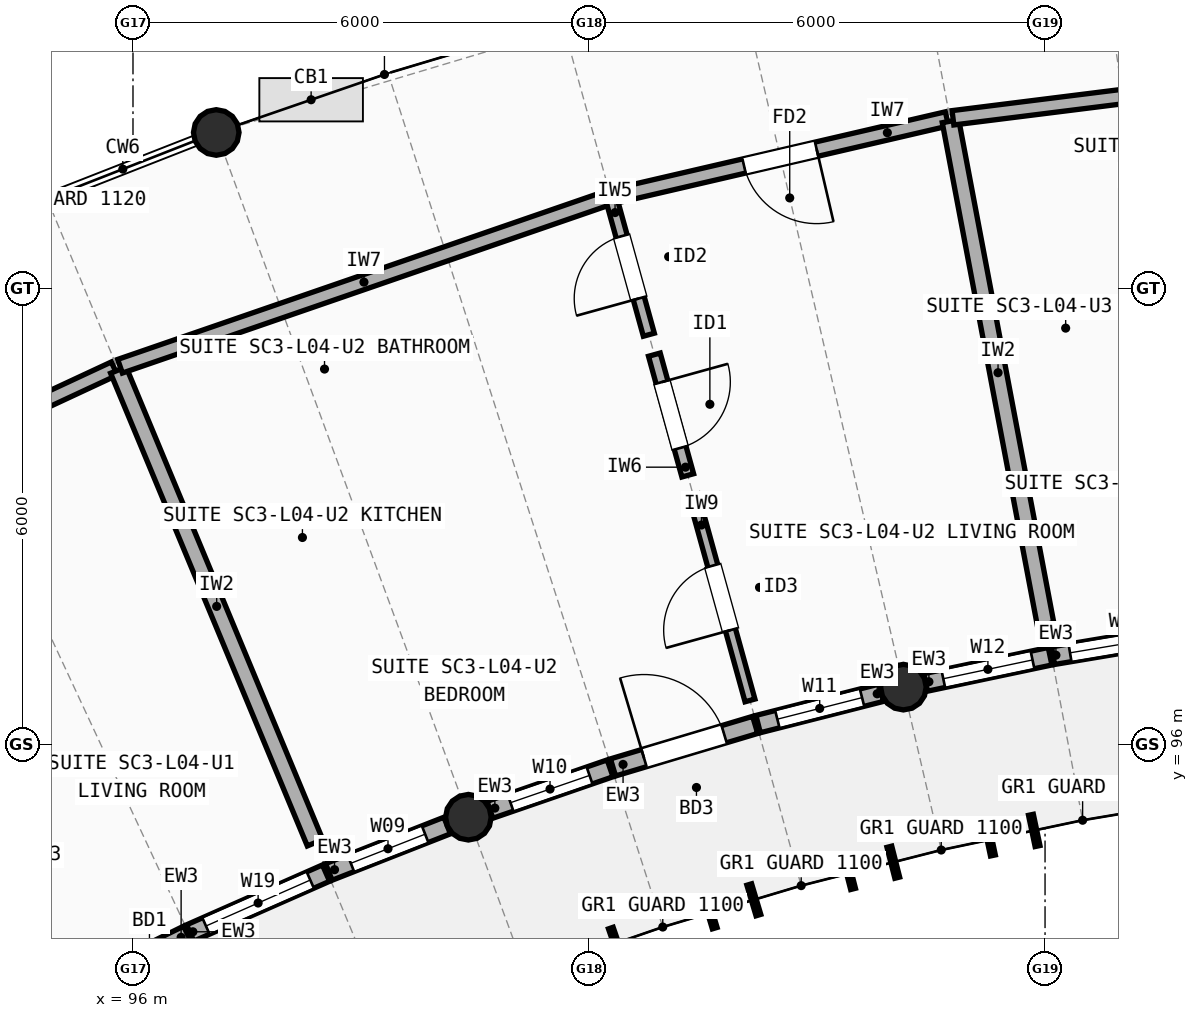
"""IFC4 building model, lengths in metres.
Left out: names, types, materials, properties, quantities, classifications, styles, units other than length and angle.
Written with IfcOpenShell. Run it as: python <this file> out.ifc"""

import sys

from ifc_helpers import new_model, si_unit, direction, frame, frame_2d, origin, origin_2d, place, context, subcontext, project, spatial, rectangle, circle, extrude, element, fill, save


model = new_model("IFC4")
c1 = context("Model", 3, precision=1e-05, world=origin(), true_north=direction((0.0, 1.0)))
c2 = subcontext(c1, "Body", "Model", "MODEL_VIEW")
j1 = project(units=[si_unit("LENGTHUNIT", "METRE"), si_unit("PLANEANGLEUNIT", "RADIAN")], contexts=[c1])
p1 = place(None, origin())
s1 = spatial("IfcSite", under=j1, at=p1, CompositionType="ELEMENT")
p2 = place(p1, origin())
s2 = spatial("IfcBuilding", under=s1, at=p2, CompositionType="ELEMENT")
p3 = place(p2, frame((0.0, 0.0, 14.1)))
s3 = spatial("IfcBuildingStorey", under=s2, at=p3, CompositionType="ELEMENT", Elevation=14.1)
for number, where, z_axis, x_axis in (
    (1, (100.413, 95.043, 0.0), (0.0, 0.0, 1.0), (1.0, 0.0, 0.0)),
    (2, (97.095, 104.052, 0.0), (0.0, 0.0, 1.0), (1.0, 0.0, 0.0)),
    (3, (106.136, 96.754, 0.0), (0.0, 0.0, 1.0), (1.0, 0.0, 0.0)),
):
    element("IfcColumn", number, at=place(p3, frame(where, z_axis=z_axis, x_axis=x_axis)), inside=s3, PredefinedType="COLUMN", context=c2, shape_type="SweptSolid", body=[
        extrude(circle(Radius=0.3, at=origin_2d()), origin(), (0.0, 0.0, 1.0), 2.948),
    ])
p4 = place(p3, frame((95.216, 92.766, 0.0), z_axis=(0.0, 0.0, 1.0), x_axis=(0.897558380725, 0.440895626186, 0.0)))
e4 = element("IfcWall", 4, at=p4, inside=s3, PredefinedType="STANDARD", context=c2, shape_type="SweptSolid", body=[
    extrude(rectangle(XDim=1.672, YDim=0.235, at=frame_2d((0.836, 0.0))), origin(), (0.0, 0.0, 1.0), 2.684),
])
p5 = place(p4, frame((0.336, 0.0, 0.0)))
e5 = element("IfcOpeningElement", 5, at=p5, cuts=e4, PredefinedType="OPENING", context=c2, shape_type="SweptSolid", body=[
    extrude(rectangle(XDim=1.0, YDim=2.15, at=frame_2d((0.5, 1.075))), frame((0.0, 0.127, 0.0), z_axis=(0.0, -1.0, 0.0), x_axis=(1.0, 0.0, 0.0)), (0.0, 0.0, 1.0), 0.255),
])
p6 = place(p3, frame((96.753, 93.521, 0.0), z_axis=(0.0, 0.0, 1.0), x_axis=(0.915126852478, 0.403166025197, 0.0)))
e6 = element("IfcWall", 6, at=p6, inside=s3, PredefinedType="STANDARD", context=c2, shape_type="SweptSolid", body=[
    extrude(rectangle(XDim=1.952, YDim=0.235, at=frame_2d((0.976, 0.0))), origin(), (0.0, 0.0, 1.0), 2.684),
])
p7 = place(p6, frame((0.226, 0.0, 0.85)))
e7 = element("IfcOpeningElement", 7, at=p7, cuts=e6, PredefinedType="OPENING", context=c2, shape_type="SweptSolid", body=[
    extrude(rectangle(XDim=1.5, YDim=1.5, at=frame_2d((0.75, 0.75))), frame((0.0, 0.127, 0.0), z_axis=(0.0, -1.0, 0.0), x_axis=(1.0, 0.0, 0.0)), (0.0, 0.0, 1.0), 0.255),
])
p8 = place(p3, frame((98.577, 94.323, 0.0), z_axis=(0.0, 0.0, 1.0), x_axis=(0.930962495902, 0.365114819233, 0.0)))
e8 = element("IfcWall", 8, at=p8, inside=s3, PredefinedType="STANDARD", context=c2, shape_type="SweptSolid", body=[
    extrude(rectangle(XDim=1.672, YDim=0.235, at=frame_2d((0.836, 0.0))), origin(), (0.0, 0.0, 1.0), 2.684),
])
p9 = place(p8, frame((0.311, 0.0, 0.85)))
e9 = element("IfcOpeningElement", 9, at=p9, cuts=e8, PredefinedType="OPENING", context=c2, shape_type="SweptSolid", body=[
    extrude(rectangle(XDim=1.05, YDim=1.35, at=frame_2d((0.525, 0.675))), frame((0.0, 0.127, 0.0), z_axis=(0.0, -1.0, 0.0), x_axis=(1.0, 0.0, 0.0)), (0.0, 0.0, 1.0), 0.255),
])
p10 = place(p3, frame((100.697, 95.141, 0.0), z_axis=(0.0, 0.0, 1.0), x_axis=(0.94537763557, 0.32597718657, 0.0)))
e10 = element("IfcWall", 10, at=p10, inside=s3, PredefinedType="STANDARD", context=c2, shape_type="SweptSolid", body=[
    extrude(rectangle(XDim=1.672, YDim=0.235, at=frame_2d((0.836, 0.0))), origin(), (0.0, 0.0, 1.0), 2.684),
])
p11 = place(p10, frame((0.286, 0.0, 0.85)))
e11 = element("IfcOpeningElement", 11, at=p11, cuts=e10, PredefinedType="OPENING", context=c2, shape_type="SweptSolid", body=[
    extrude(rectangle(XDim=1.1, YDim=1.45, at=frame_2d((0.55, 0.725))), frame((0.0, 0.127, 0.0), z_axis=(0.0, -1.0, 0.0), x_axis=(1.0, 0.0, 0.0)), (0.0, 0.0, 1.0), 0.255),
])
p12 = place(p3, frame((102.316, 95.698, 0.0), z_axis=(0.0, 0.0, 1.0), x_axis=(0.95807718441, 0.286510224446, 0.0)))
e12 = element("IfcWall", 12, at=p12, inside=s3, PredefinedType="STANDARD", context=c2, shape_type="SweptSolid", body=[
    extrude(rectangle(XDim=1.952, YDim=0.235, at=frame_2d((0.976, 0.0))), origin(), (0.0, 0.0, 1.0), 2.684),
])
p13 = place(p12, frame((0.426, 0.0, 0.0)))
e13 = element("IfcOpeningElement", 13, at=p13, cuts=e12, PredefinedType="OPENING", context=c2, shape_type="SweptSolid", body=[
    extrude(rectangle(XDim=1.1, YDim=2.15, at=frame_2d((0.55, 1.075))), frame((0.0, 0.127, 0.0), z_axis=(0.0, -1.0, 0.0), x_axis=(1.0, 0.0, 0.0)), (0.0, 0.0, 1.0), 0.255),
])
p14 = place(p3, frame((104.225, 96.268, 0.0), z_axis=(0.0, 0.0, 1.0), x_axis=(0.969164394975, 0.246415047254, 0.0)))
e14 = element("IfcWall", 14, at=p14, inside=s3, PredefinedType="STANDARD", context=c2, shape_type="SweptSolid", body=[
    extrude(rectangle(XDim=1.672, YDim=0.235, at=frame_2d((0.836, 0.0))), origin(), (0.0, 0.0, 1.0), 2.684),
])
p15 = place(p14, frame((0.261, 0.0, 0.85)))
e15 = element("IfcOpeningElement", 15, at=p15, cuts=e14, PredefinedType="OPENING", context=c2, shape_type="SweptSolid", body=[
    extrude(rectangle(XDim=1.15, YDim=1.45, at=frame_2d((0.575, 0.725))), frame((0.0, 0.127, 0.0), z_axis=(0.0, -1.0, 0.0), x_axis=(1.0, 0.0, 0.0)), (0.0, 0.0, 1.0), 0.255),
])
p16 = place(p3, frame((106.43, 96.816, 0.0), z_axis=(0.0, 0.0, 1.0), x_axis=(0.978524995622, 0.206128195408, 0.0)))
e16 = element("IfcWall", 16, at=p16, inside=s3, PredefinedType="STANDARD", context=c2, shape_type="SweptSolid", body=[
    extrude(rectangle(XDim=1.672, YDim=0.235, at=frame_2d((0.836, 0.0))), origin(), (0.0, 0.0, 1.0), 2.684),
])
p17 = place(p16, frame((0.236, 0.0, 0.85)))
e17 = element("IfcOpeningElement", 17, at=p17, cuts=e16, PredefinedType="OPENING", context=c2, shape_type="SweptSolid", body=[
    extrude(rectangle(XDim=1.2, YDim=1.35, at=frame_2d((0.6, 0.675))), frame((0.0, 0.127, 0.0), z_axis=(0.0, -1.0, 0.0), x_axis=(1.0, 0.0, 0.0)), (0.0, 0.0, 1.0), 0.255),
])
p18 = place(p3, frame((108.105, 97.168, 0.0), z_axis=(0.0, 0.0, 1.0), x_axis=(0.986241418229, 0.165311418144, 0.0)))
e18 = element("IfcWall", 18, at=p18, inside=s3, PredefinedType="STANDARD", context=c2, shape_type="SweptSolid", body=[
    extrude(rectangle(XDim=1.952, YDim=0.235, at=frame_2d((0.976, 0.0))), origin(), (0.0, 0.0, 1.0), 2.684),
])
p19 = place(p18, frame((0.226, 0.0, 0.85)))
e19 = element("IfcOpeningElement", 19, at=p19, cuts=e18, PredefinedType="OPENING", context=c2, shape_type="SweptSolid", body=[
    extrude(rectangle(XDim=1.5, YDim=1.4, at=frame_2d((0.75, 0.7))), frame((0.0, 0.127, 0.0), z_axis=(0.0, -1.0, 0.0), x_axis=(1.0, 0.0, 0.0)), (0.0, 0.0, 1.0), 0.255),
])
p20 = place(p3, frame((91.675, 99.046, 0.0), z_axis=(0.0, 0.0, 1.0), x_axis=(0.906512639591, 0.422178675755, 0.0)))
e20 = element("IfcWall", 20, at=p20, inside=s3, PredefinedType="SOLIDWALL", context=c2, shape_type="SweptSolid", body=[
    extrude(rectangle(XDim=4.501, YDim=0.19, at=frame_2d((2.251, 0.0))), origin(), (0.0, 0.0, 1.0), 2.742),
])
p21 = place(p20, frame((1.751, 0.0, 0.0)))
e21 = element("IfcOpeningElement", 21, at=p21, cuts=e20, PredefinedType="OPENING", context=c2, shape_type="SweptSolid", body=[
    extrude(rectangle(XDim=1.0, YDim=2.15, at=frame_2d((0.5, 1.075))), frame((0.0, 0.105, 0.0), z_axis=(0.0, -1.0, 0.0), x_axis=(1.0, 0.0, 0.0)), (0.0, 0.0, 1.0), 0.21),
])
p22 = place(p3, frame((98.395, 94.707, 0.0), z_axis=(0.0, 0.0, 1.0), x_axis=(-0.384190705314, 0.923253758157, 0.0)))
e22 = element("IfcWall", 22, at=p22, inside=s3, PredefinedType="SOLIDWALL", context=c2, shape_type="SweptSolid", body=[
    extrude(rectangle(XDim=6.736, YDim=0.22, at=frame_2d((3.368, 0.0))), origin(), (0.0, 0.0, 1.0), 2.762),
])
p23 = place(p3, frame((95.83, 100.976, 0.0), z_axis=(0.0, 0.0, 1.0), x_axis=(0.945371453115, 0.325995115969, 0.0)))
e23 = element("IfcWall", 23, at=p23, inside=s3, PredefinedType="SOLIDWALL", context=c2, shape_type="SweptSolid", body=[
    extrude(rectangle(XDim=6.79, YDim=0.19, at=frame_2d((3.395, 0.0))), origin(), (0.0, 0.0, 1.0), 2.722),
])
p24 = place(p3, frame((102.325, 103.212, 0.0), z_axis=(0.0, 0.0, 1.0), x_axis=(0.974052809246, 0.226320844821, 0.0)))
e24 = element("IfcWall", 24, at=p24, inside=s3, PredefinedType="SOLIDWALL", context=c2, shape_type="SweptSolid", body=[
    extrude(rectangle(XDim=4.501, YDim=0.19, at=frame_2d((2.251, 0.0))), origin(), (0.0, 0.0, 1.0), 2.722),
])
p25 = place(p24, frame((1.761, 0.0, 0.0)))
e25 = element("IfcOpeningElement", 25, at=p25, cuts=e24, PredefinedType="OPENING", context=c2, shape_type="SweptSolid", body=[
    extrude(rectangle(XDim=0.98, YDim=2.15, at=frame_2d((0.49, 1.075))), frame((0.0, 0.105, 0.0), z_axis=(0.0, -1.0, 0.0), x_axis=(1.0, 0.0, 0.0)), (0.0, 0.0, 1.0), 0.21),
])
p26 = place(p3, frame((104.118, 96.58, 0.0), z_axis=(0.0, 0.0, 1.0), x_axis=(-0.266568819947, 0.963815887103, 0.0)))
e26 = element("IfcWall", 26, at=p26, inside=s3, PredefinedType="PARTITIONING", context=c2, shape_type="SweptSolid", body=[
    extrude(rectangle(XDim=2.8, YDim=0.135, at=frame_2d((1.4, 0.0))), origin(), (0.0, 0.0, 1.0), 2.762),
])
p27 = place(p26, frame((0.96, 0.0, 0.0)))
e27 = element("IfcOpeningElement", 27, at=p27, cuts=e26, PredefinedType="OPENING", context=c2, shape_type="SweptSolid", body=[
    extrude(rectangle(XDim=0.88, YDim=2.1, at=frame_2d((0.44, 1.05))), frame((0.0, 0.077, 0.0), z_axis=(0.0, -1.0, 0.0), x_axis=(1.0, 0.0, 0.0)), (0.0, 0.0, 1.0), 0.155),
])
p28 = place(p3, frame((103.299, 99.54, 0.0), z_axis=(0.0, 0.0, 1.0), x_axis=(-0.266512853444, 0.963831364373, 0.0)))
e28 = element("IfcWall", 28, at=p28, inside=s3, PredefinedType="PLUMBINGWALL", context=c2, shape_type="SweptSolid", body=[
    extrude(rectangle(XDim=1.648, YDim=0.16, at=frame_2d((0.824, 0.0))), origin(), (0.0, 0.0, 1.0), 2.762),
])
p29 = place(p28, frame((0.374, 0.0, 0.0)))
e29 = element("IfcOpeningElement", 29, at=p29, cuts=e28, PredefinedType="OPENING", context=c2, shape_type="SweptSolid", body=[
    extrude(rectangle(XDim=0.9, YDim=2.1, at=frame_2d((0.45, 1.05))), frame((0.0, 0.09, 0.0), z_axis=(0.0, -1.0, 0.0), x_axis=(1.0, 0.0, 0.0)), (0.0, 0.0, 1.0), 0.18),
])
p30 = place(p3, frame((102.787, 101.391, 0.0), z_axis=(0.0, 0.0, 1.0), x_axis=(-0.266562452526, 0.963817648159, 0.0)))
e30 = element("IfcWall", 30, at=p30, inside=s3, PredefinedType="PARTITIONING", context=c2, shape_type="SweptSolid", body=[
    extrude(rectangle(XDim=1.84, YDim=0.15, at=frame_2d((0.92, 0.0))), origin(), (0.0, 0.0, 1.0), 2.762),
])
p31 = place(p30, frame((0.495, 0.0, 0.0)))
e31 = element("IfcOpeningElement", 31, at=p31, cuts=e30, PredefinedType="OPENING", context=c2, shape_type="SweptSolid", body=[
    extrude(rectangle(XDim=0.85, YDim=2.1, at=frame_2d((0.425, 1.05))), frame((0.0, 0.085, 0.0), z_axis=(0.0, -1.0, 0.0), x_axis=(1.0, 0.0, 0.0)), (0.0, 0.0, 1.0), 0.17),
])
p32 = place(p3, frame((108.007, 97.582, 0.0), z_axis=(0.0, 0.0, 1.0), x_axis=(-0.185712925624, 0.982604045003, 0.0)))
e32 = element("IfcWall", 32, at=p32, inside=s3, PredefinedType="SOLIDWALL", context=c2, shape_type="SweptSolid", body=[
    extrude(rectangle(XDim=6.736, YDim=0.22, at=frame_2d((3.368, 0.0))), origin(), (0.0, 0.0, 1.0), 2.742),
])
p33 = place(p3, frame((106.788, 104.245, 0.0), z_axis=(0.0, 0.0, 1.0), x_axis=(0.992257394877, 0.124198479504, 0.0)))
e33 = element("IfcWall", 33, at=p33, inside=s3, PredefinedType="SOLIDWALL", context=c2, shape_type="SweptSolid", body=[
    extrude(rectangle(XDim=6.79, YDim=0.19, at=frame_2d((3.395, 0.0))), origin(), (0.0, 0.0, 1.0), 2.722),
])
p34 = place(p7, origin())
e34 = element("IfcWindow", 34, at=p34, inside=s3, PartitioningType="SINGLE_PANEL", PredefinedType="WINDOW", context=c2, shape_type="SweptSolid", body=[
    extrude(rectangle(XDim=1.5, YDim=1.5, at=frame_2d((0.75, 0.75))), frame((0.0, 0.03, 0.0), z_axis=(0.0, -1.0, 0.0), x_axis=(1.0, 0.0, 0.0)), (0.0, 0.0, 1.0), 0.06),
])
fill(e7, e34)
p35 = place(p9, origin())
e35 = element("IfcWindow", 35, at=p35, inside=s3, PartitioningType="SINGLE_PANEL", PredefinedType="WINDOW", context=c2, shape_type="SweptSolid", body=[
    extrude(rectangle(XDim=1.05, YDim=1.35, at=frame_2d((0.525, 0.675))), frame((0.0, 0.03, 0.0), z_axis=(0.0, -1.0, 0.0), x_axis=(1.0, 0.0, 0.0)), (0.0, 0.0, 1.0), 0.06),
])
fill(e9, e35)
p36 = place(p11, origin())
e36 = element("IfcWindow", 36, at=p36, inside=s3, PartitioningType="SINGLE_PANEL", PredefinedType="WINDOW", context=c2, shape_type="SweptSolid", body=[
    extrude(rectangle(XDim=1.1, YDim=1.45, at=frame_2d((0.55, 0.725))), frame((0.0, 0.03, 0.0), z_axis=(0.0, -1.0, 0.0), x_axis=(1.0, 0.0, 0.0)), (0.0, 0.0, 1.0), 0.06),
])
fill(e11, e36)
p37 = place(p13, frame((1.1, 0.0, 0.0), z_axis=(0.0, 0.0, 1.0), x_axis=(-1.0, 0.0, 0.0)))
e37 = element("IfcDoor", 37, at=p37, inside=s3, OperationType="SINGLE_SWING_LEFT", PredefinedType="DOOR", context=c2, shape_type="SweptSolid", body=[
    extrude(rectangle(XDim=1.1, YDim=2.15, at=frame_2d((0.55, 1.075))), frame((0.0, 0.025, 0.0), z_axis=(0.0, -1.0, 0.0), x_axis=(1.0, 0.0, 0.0)), (0.0, 0.0, 1.0), 0.05),
])
fill(e13, e37)
p38 = place(p15, origin())
e38 = element("IfcWindow", 38, at=p38, inside=s3, PartitioningType="SINGLE_PANEL", PredefinedType="WINDOW", context=c2, shape_type="SweptSolid", body=[
    extrude(rectangle(XDim=1.15, YDim=1.45, at=frame_2d((0.575, 0.725))), frame((0.0, 0.03, 0.0), z_axis=(0.0, -1.0, 0.0), x_axis=(1.0, 0.0, 0.0)), (0.0, 0.0, 1.0), 0.06),
])
fill(e15, e38)
p39 = place(p17, origin())
e39 = element("IfcWindow", 39, at=p39, inside=s3, PartitioningType="SINGLE_PANEL", PredefinedType="WINDOW", context=c2, shape_type="SweptSolid", body=[
    extrude(rectangle(XDim=1.2, YDim=1.35, at=frame_2d((0.6, 0.675))), frame((0.0, 0.03, 0.0), z_axis=(0.0, -1.0, 0.0), x_axis=(1.0, 0.0, 0.0)), (0.0, 0.0, 1.0), 0.06),
])
fill(e17, e39)
p40 = place(p19, origin())
e40 = element("IfcWindow", 40, at=p40, inside=s3, PartitioningType="SINGLE_PANEL", PredefinedType="WINDOW", context=c2, shape_type="SweptSolid", body=[
    extrude(rectangle(XDim=1.5, YDim=1.4, at=frame_2d((0.75, 0.7))), frame((0.0, 0.03, 0.0), z_axis=(0.0, -1.0, 0.0), x_axis=(1.0, 0.0, 0.0)), (0.0, 0.0, 1.0), 0.06),
])
fill(e19, e40)
p41 = place(p25, origin())
e41 = element("IfcDoor", 41, at=p41, inside=s3, OperationType="SINGLE_SWING_RIGHT", PredefinedType="DOOR", context=c2, shape_type="SweptSolid", body=[
    extrude(rectangle(XDim=0.98, YDim=2.15, at=frame_2d((0.49, 1.075))), frame((0.0, 0.025, 0.0), z_axis=(0.0, -1.0, 0.0), x_axis=(1.0, 0.0, 0.0)), (0.0, 0.0, 1.0), 0.05),
])
fill(e25, e41)
p42 = place(p27, origin())
e42 = element("IfcDoor", 42, at=p42, inside=s3, OperationType="SINGLE_SWING_LEFT", PredefinedType="DOOR", context=c2, shape_type="SweptSolid", body=[
    extrude(rectangle(XDim=0.88, YDim=2.1, at=frame_2d((0.44, 1.05))), frame((0.0, 0.025, 0.0), z_axis=(0.0, -1.0, 0.0), x_axis=(1.0, 0.0, 0.0)), (0.0, 0.0, 1.0), 0.05),
])
fill(e27, e42)
p43 = place(p29, origin())
e43 = element("IfcDoor", 43, at=p43, inside=s3, OperationType="SINGLE_SWING_RIGHT", PredefinedType="DOOR", context=c2, shape_type="SweptSolid", body=[
    extrude(rectangle(XDim=0.9, YDim=2.1, at=frame_2d((0.45, 1.05))), frame((0.0, 0.025, 0.0), z_axis=(0.0, -1.0, 0.0), x_axis=(1.0, 0.0, 0.0)), (0.0, 0.0, 1.0), 0.05),
])
fill(e29, e43)
p44 = place(p31, origin())
e44 = element("IfcDoor", 44, at=p44, inside=s3, OperationType="SINGLE_SWING_LEFT", PredefinedType="DOOR", context=c2, shape_type="SweptSolid", body=[
    extrude(rectangle(XDim=0.85, YDim=2.1, at=frame_2d((0.425, 1.05))), frame((0.0, 0.025, 0.0), z_axis=(0.0, -1.0, 0.0), x_axis=(1.0, 0.0, 0.0)), (0.0, 0.0, 1.0), 0.05),
])
fill(e31, e44)
save(model, sys.argv[1])
